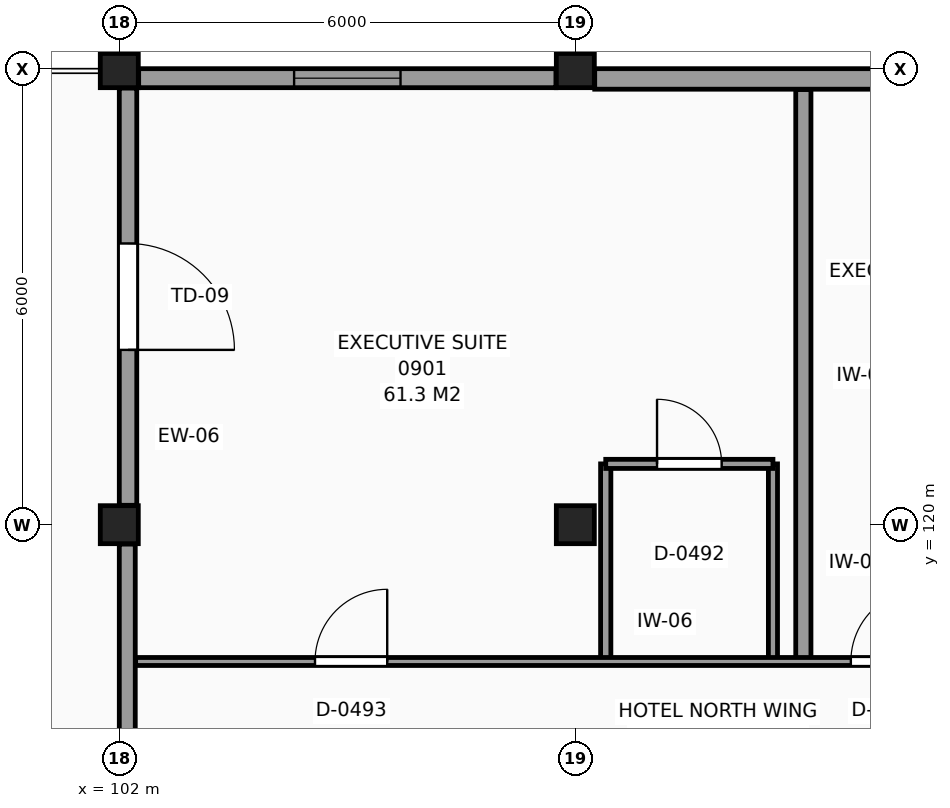
"""IFC4 building model, lengths in metres.
Left out: names, types, materials, properties, quantities, classifications, styles, units other than length and angle.
Written with IfcOpenShell. Run it as: python <this file> out.ifc"""

import sys

from ifc_helpers import new_model, si_unit, direction, frame, frame_2d, origin, origin_2d, place, context, subcontext, project, spatial, rectangle, extrude, element, fill, save


model = new_model("IFC4")
c1 = context("Model", 3, precision=1e-05, world=origin(), true_north=direction((0.0, 1.0)))
c2 = subcontext(c1, "Body", "Model", "MODEL_VIEW")
j1 = project(units=[si_unit("LENGTHUNIT", "METRE"), si_unit("PLANEANGLEUNIT", "RADIAN")], contexts=[c1])
p1 = place(None, origin())
s1 = spatial("IfcSite", under=j1, at=p1, CompositionType="ELEMENT")
p2 = place(p1, origin())
s2 = spatial("IfcBuilding", under=s1, at=p2, CompositionType="ELEMENT")
p3 = place(p2, frame((0.0, 0.0, 38.1)))
s3 = spatial("IfcBuildingStorey", under=s2, at=p3, CompositionType="ELEMENT", Elevation=38.1)
for number, where, z_axis, x_axis in (
    (1, (102.0, 120.0, 0.0), (0.0, 0.0, 1.0), (1.0, 0.0, 0.0)),
    (2, (102.0, 126.0, 0.0), (0.0, 0.0, 1.0), (1.0, 0.0, 0.0)),
    (3, (108.0, 120.0, 0.0), (0.0, 0.0, 1.0), (1.0, 0.0, 0.0)),
    (4, (108.0, 126.0, 0.0), (0.0, 0.0, 1.0), (1.0, 0.0, 0.0)),
):
    element("IfcColumn", number, at=place(p3, frame(where, z_axis=z_axis, x_axis=x_axis)), inside=s3, PredefinedType="COLUMN", context=c2, shape_type="SweptSolid", body=[
        extrude(rectangle(XDim=0.5, YDim=0.5, at=origin_2d()), origin(), (0.0, 0.0, 1.0), 3.3),
    ])
p4 = place(p3, frame((113.745, 125.865, 0.0), z_axis=(0.0, 0.0, 1.0), x_axis=(-1.0, 0.0, 0.0)))
e5 = element("IfcWall", 5, at=p4, inside=s3, PredefinedType="SOLIDWALL", context=c2, shape_type="SweptSolid", body=[
    extrude(rectangle(XDim=5.49, YDim=0.27, at=frame_2d((2.745, 0.0))), origin(), (0.0, 0.0, 1.0), 2.41),
])
p5 = place(p3, frame((107.745, 125.875, 0.0), z_axis=(0.0, 0.0, 1.0), x_axis=(-1.0, 0.0, 0.0)))
e6 = element("IfcWall", 6, at=p5, inside=s3, PredefinedType="SOLIDWALL", context=c2, shape_type="SweptSolid", body=[
    extrude(rectangle(XDim=5.49, YDim=0.25, at=frame_2d((2.745, 0.0))), origin(), (0.0, 0.0, 1.0), 2.41),
])
p6 = place(p5, frame((2.045, 0.0, 0.8)))
e7 = element("IfcOpeningElement", 7, at=p6, cuts=e6, PredefinedType="OPENING", context=c2, shape_type="SweptSolid", body=[
    extrude(rectangle(XDim=1.4, YDim=1.4, at=frame_2d((0.7, 0.7))), frame((0.0, 0.135, 0.0), z_axis=(0.0, -1.0, 0.0), x_axis=(1.0, 0.0, 0.0)), (0.0, 0.0, 1.0), 0.27),
])
p7 = place(p3, frame((102.115, 125.745, 0.0), z_axis=(0.0, 0.0, 1.0), x_axis=(0.0, -1.0, 0.0)))
e8 = element("IfcWall", 8, at=p7, inside=s3, PredefinedType="SOLIDWALL", context=c2, shape_type="SweptSolid", body=[
    extrude(rectangle(XDim=5.49, YDim=0.23, at=frame_2d((2.745, 0.0))), origin(), (0.0, 0.0, 1.0), 2.26),
])
p8 = place(p7, frame((2.045, 0.0, 0.0)))
e9 = element("IfcOpeningElement", 9, at=p8, cuts=e8, PredefinedType="OPENING", context=c2, shape_type="SweptSolid", body=[
    extrude(rectangle(XDim=1.4, YDim=2.1, at=frame_2d((0.7, 1.05))), frame((0.0, 0.125, 0.0), z_axis=(0.0, -1.0, 0.0), x_axis=(1.0, 0.0, 0.0)), (0.0, 0.0, 1.0), 0.25),
])
p9 = place(p3, frame((102.105, 119.745, 0.0), z_axis=(0.0, 0.0, 1.0), x_axis=(0.0, -1.0, 0.0)))
e10 = element("IfcWall", 10, at=p9, inside=s3, PredefinedType="SOLIDWALL", context=c2, shape_type="SweptSolid", body=[
    extrude(rectangle(XDim=5.49, YDim=0.21, at=frame_2d((2.745, 0.0))), origin(), (0.0, 0.0, 1.0), 2.26),
])
p10 = place(p3, frame((108.4, 118.2, 0.0), z_axis=(0.0, 0.0, 1.0), x_axis=(0.0, 1.0, 0.0)))
e11 = element("IfcWall", 11, at=p10, inside=s3, PredefinedType="PARTITIONING", context=c2, shape_type="SweptSolid", body=[
    extrude(rectangle(XDim=2.6, YDim=0.135, at=frame_2d((1.3, 0.0))), origin(), (0.0, 0.0, 1.0), 3.06),
])
p11 = place(p3, frame((110.6, 118.2, 0.0), z_axis=(0.0, 0.0, 1.0), x_axis=(0.0, 1.0, 0.0)))
e12 = element("IfcWall", 12, at=p11, inside=s3, PredefinedType="PARTITIONING", context=c2, shape_type="SweptSolid", body=[
    extrude(rectangle(XDim=2.6, YDim=0.12, at=frame_2d((1.3, 0.0))), origin(), (0.0, 0.0, 1.0), 3.06),
])
p12 = place(p3, frame((111.0, 118.2, 0.0), z_axis=(0.0, 0.0, 1.0), x_axis=(0.0, 1.0, 0.0)))
e13 = element("IfcWall", 13, at=p12, inside=s3, PredefinedType="PARTITIONING", context=c2, shape_type="SweptSolid", body=[
    extrude(rectangle(XDim=7.525, YDim=0.2, at=frame_2d((3.763, 0.0))), origin(), (0.0, 0.0, 1.0), 3.06),
])
p13 = place(p3, frame((102.215, 118.2, 0.0), z_axis=(0.0, 0.0, 1.0), x_axis=(1.0, 0.0, 0.0)))
e14 = element("IfcWall", 14, at=p13, inside=s3, PredefinedType="PARTITIONING", context=c2, shape_type="SweptSolid", body=[
    extrude(rectangle(XDim=74.285, YDim=0.105, at=frame_2d((37.143, 0.0))), origin(), (0.0, 0.0, 1.0), 3.06),
])
p14 = place(p13, frame((2.36, 0.0, 0.0)))
e15 = element("IfcOpeningElement", 15, at=p14, cuts=e14, PredefinedType="OPENING", context=c2, shape_type="SweptSolid", body=[
    extrude(rectangle(XDim=0.95, YDim=2.1, at=frame_2d((0.475, 1.05))), frame((0.0, 0.062, 0.0), z_axis=(0.0, -1.0, 0.0), x_axis=(1.0, 0.0, 0.0)), (0.0, 0.0, 1.0), 0.125),
])
p15 = place(p13, frame((9.41, 0.0, 0.0)))
e16 = element("IfcOpeningElement", 16, at=p15, cuts=e14, PredefinedType="OPENING", context=c2, shape_type="SweptSolid", body=[
    extrude(rectangle(XDim=0.95, YDim=2.1, at=frame_2d((0.475, 1.05))), frame((0.0, 0.062, 0.0), z_axis=(0.0, -1.0, 0.0), x_axis=(1.0, 0.0, 0.0)), (0.0, 0.0, 1.0), 0.125),
])
p16 = place(p13, frame((18.51, 0.0, 0.0)))
e17 = element("IfcOpeningElement", 17, at=p16, cuts=e14, PredefinedType="OPENING", context=c2, shape_type="SweptSolid", body=[
    extrude(rectangle(XDim=0.95, YDim=2.1, at=frame_2d((0.475, 1.05))), frame((0.0, 0.062, 0.0), z_axis=(0.0, -1.0, 0.0), x_axis=(1.0, 0.0, 0.0)), (0.0, 0.0, 1.0), 0.125),
])
p17 = place(p13, frame((32.36, 0.0, 0.0)))
e18 = element("IfcOpeningElement", 18, at=p17, cuts=e14, PredefinedType="OPENING", context=c2, shape_type="SweptSolid", body=[
    extrude(rectangle(XDim=0.95, YDim=2.1, at=frame_2d((0.475, 1.05))), frame((0.0, 0.062, 0.0), z_axis=(0.0, -1.0, 0.0), x_axis=(1.0, 0.0, 0.0)), (0.0, 0.0, 1.0), 0.125),
])
p18 = place(p13, frame((34.91, 0.0, 0.0)))
e19 = element("IfcOpeningElement", 19, at=p18, cuts=e14, PredefinedType="OPENING", context=c2, shape_type="SweptSolid", body=[
    extrude(rectangle(XDim=0.95, YDim=2.1, at=frame_2d((0.475, 1.05))), frame((0.0, 0.062, 0.0), z_axis=(0.0, -1.0, 0.0), x_axis=(1.0, 0.0, 0.0)), (0.0, 0.0, 1.0), 0.125),
])
p19 = place(p13, frame((42.11, 0.0, 0.0)))
e20 = element("IfcOpeningElement", 20, at=p19, cuts=e14, PredefinedType="OPENING", context=c2, shape_type="SweptSolid", body=[
    extrude(rectangle(XDim=0.95, YDim=2.1, at=frame_2d((0.475, 1.05))), frame((0.0, 0.062, 0.0), z_axis=(0.0, -1.0, 0.0), x_axis=(1.0, 0.0, 0.0)), (0.0, 0.0, 1.0), 0.125),
])
p20 = place(p13, frame((50.36, 0.0, 0.0)))
e21 = element("IfcOpeningElement", 21, at=p20, cuts=e14, PredefinedType="OPENING", context=c2, shape_type="SweptSolid", body=[
    extrude(rectangle(XDim=0.95, YDim=2.1, at=frame_2d((0.475, 1.05))), frame((0.0, 0.062, 0.0), z_axis=(0.0, -1.0, 0.0), x_axis=(1.0, 0.0, 0.0)), (0.0, 0.0, 1.0), 0.125),
])
p21 = place(p13, frame((52.91, 0.0, 0.0)))
e22 = element("IfcOpeningElement", 22, at=p21, cuts=e14, PredefinedType="OPENING", context=c2, shape_type="SweptSolid", body=[
    extrude(rectangle(XDim=0.95, YDim=2.1, at=frame_2d((0.475, 1.05))), frame((0.0, 0.062, 0.0), z_axis=(0.0, -1.0, 0.0), x_axis=(1.0, 0.0, 0.0)), (0.0, 0.0, 1.0), 0.125),
])
p22 = place(p13, frame((60.11, 0.0, 0.0)))
e23 = element("IfcOpeningElement", 23, at=p22, cuts=e14, PredefinedType="OPENING", context=c2, shape_type="SweptSolid", body=[
    extrude(rectangle(XDim=0.95, YDim=2.1, at=frame_2d((0.475, 1.05))), frame((0.0, 0.062, 0.0), z_axis=(0.0, -1.0, 0.0), x_axis=(1.0, 0.0, 0.0)), (0.0, 0.0, 1.0), 0.125),
])
p23 = place(p13, frame((64.31, 0.0, 0.0)))
e24 = element("IfcOpeningElement", 24, at=p23, cuts=e14, PredefinedType="OPENING", context=c2, shape_type="SweptSolid", body=[
    extrude(rectangle(XDim=0.95, YDim=2.1, at=frame_2d((0.475, 1.05))), frame((0.0, 0.062, 0.0), z_axis=(0.0, -1.0, 0.0), x_axis=(1.0, 0.0, 0.0)), (0.0, 0.0, 1.0), 0.125),
])
p24 = place(p13, frame((68.26, 0.0, 0.0)))
e25 = element("IfcOpeningElement", 25, at=p24, cuts=e14, PredefinedType="OPENING", context=c2, shape_type="SweptSolid", body=[
    extrude(rectangle(XDim=0.95, YDim=2.1, at=frame_2d((0.475, 1.05))), frame((0.0, 0.062, 0.0), z_axis=(0.0, -1.0, 0.0), x_axis=(1.0, 0.0, 0.0)), (0.0, 0.0, 1.0), 0.125),
])
p25 = place(p3, frame((108.4, 120.8, 0.0), z_axis=(0.0, 0.0, 1.0), x_axis=(1.0, 0.0, 0.0)))
e26 = element("IfcWall", 26, at=p25, inside=s3, PredefinedType="PARTITIONING", context=c2, shape_type="SweptSolid", body=[
    extrude(rectangle(XDim=2.2, YDim=0.12, at=frame_2d((1.1, 0.0))), origin(), (0.0, 0.0, 1.0), 3.06),
])
p26 = place(p25, frame((0.675, 0.0, 0.0)))
e27 = element("IfcOpeningElement", 27, at=p26, cuts=e26, PredefinedType="OPENING", context=c2, shape_type="SweptSolid", body=[
    extrude(rectangle(XDim=0.85, YDim=2.1, at=frame_2d((0.425, 1.05))), frame((0.0, 0.07, 0.0), z_axis=(0.0, -1.0, 0.0), x_axis=(1.0, 0.0, 0.0)), (0.0, 0.0, 1.0), 0.14),
])
p27 = place(p8, frame((1.4, 0.0, 0.0), z_axis=(0.0, 0.0, 1.0), x_axis=(-1.0, 0.0, 0.0)))
e28 = element("IfcDoor", 28, at=p27, inside=s3, OperationType="SINGLE_SWING_RIGHT", PredefinedType="DOOR", context=c2, shape_type="SweptSolid", body=[
    extrude(rectangle(XDim=1.4, YDim=2.1, at=frame_2d((0.7, 1.05))), frame((0.0, 0.025, 0.0), z_axis=(0.0, -1.0, 0.0), x_axis=(1.0, 0.0, 0.0)), (0.0, 0.0, 1.0), 0.05),
])
fill(e9, e28)
p28 = place(p6, origin())
e29 = element("IfcWindow", 29, at=p28, inside=s3, PartitioningType="SINGLE_PANEL", PredefinedType="WINDOW", context=c2, shape_type="SweptSolid", body=[
    extrude(rectangle(XDim=1.4, YDim=1.4, at=frame_2d((0.7, 0.7))), frame((0.0, 0.03, 0.0), z_axis=(0.0, -1.0, 0.0), x_axis=(1.0, 0.0, 0.0)), (0.0, 0.0, 1.0), 0.06),
])
fill(e7, e29)
p29 = place(p26, origin())
e30 = element("IfcDoor", 30, at=p29, inside=s3, OperationType="SINGLE_SWING_LEFT", PredefinedType="DOOR", context=c2, shape_type="SweptSolid", body=[
    extrude(rectangle(XDim=0.85, YDim=2.1, at=frame_2d((0.425, 1.05))), frame((0.0, 0.025, 0.0), z_axis=(0.0, -1.0, 0.0), x_axis=(1.0, 0.0, 0.0)), (0.0, 0.0, 1.0), 0.05),
])
fill(e27, e30)
p30 = place(p14, origin())
e31 = element("IfcDoor", 31, at=p30, inside=s3, OperationType="SINGLE_SWING_RIGHT", PredefinedType="DOOR", context=c2, shape_type="SweptSolid", body=[
    extrude(rectangle(XDim=0.95, YDim=2.1, at=frame_2d((0.475, 1.05))), frame((0.0, 0.025, 0.0), z_axis=(0.0, -1.0, 0.0), x_axis=(1.0, 0.0, 0.0)), (0.0, 0.0, 1.0), 0.05),
])
fill(e15, e31)
p31 = place(p15, origin())
e32 = element("IfcDoor", 32, at=p31, inside=s3, OperationType="SINGLE_SWING_RIGHT", PredefinedType="DOOR", context=c2, shape_type="SweptSolid", body=[
    extrude(rectangle(XDim=0.95, YDim=2.1, at=frame_2d((0.475, 1.05))), frame((0.0, 0.025, 0.0), z_axis=(0.0, -1.0, 0.0), x_axis=(1.0, 0.0, 0.0)), (0.0, 0.0, 1.0), 0.05),
])
fill(e16, e32)
save(model, sys.argv[1])
